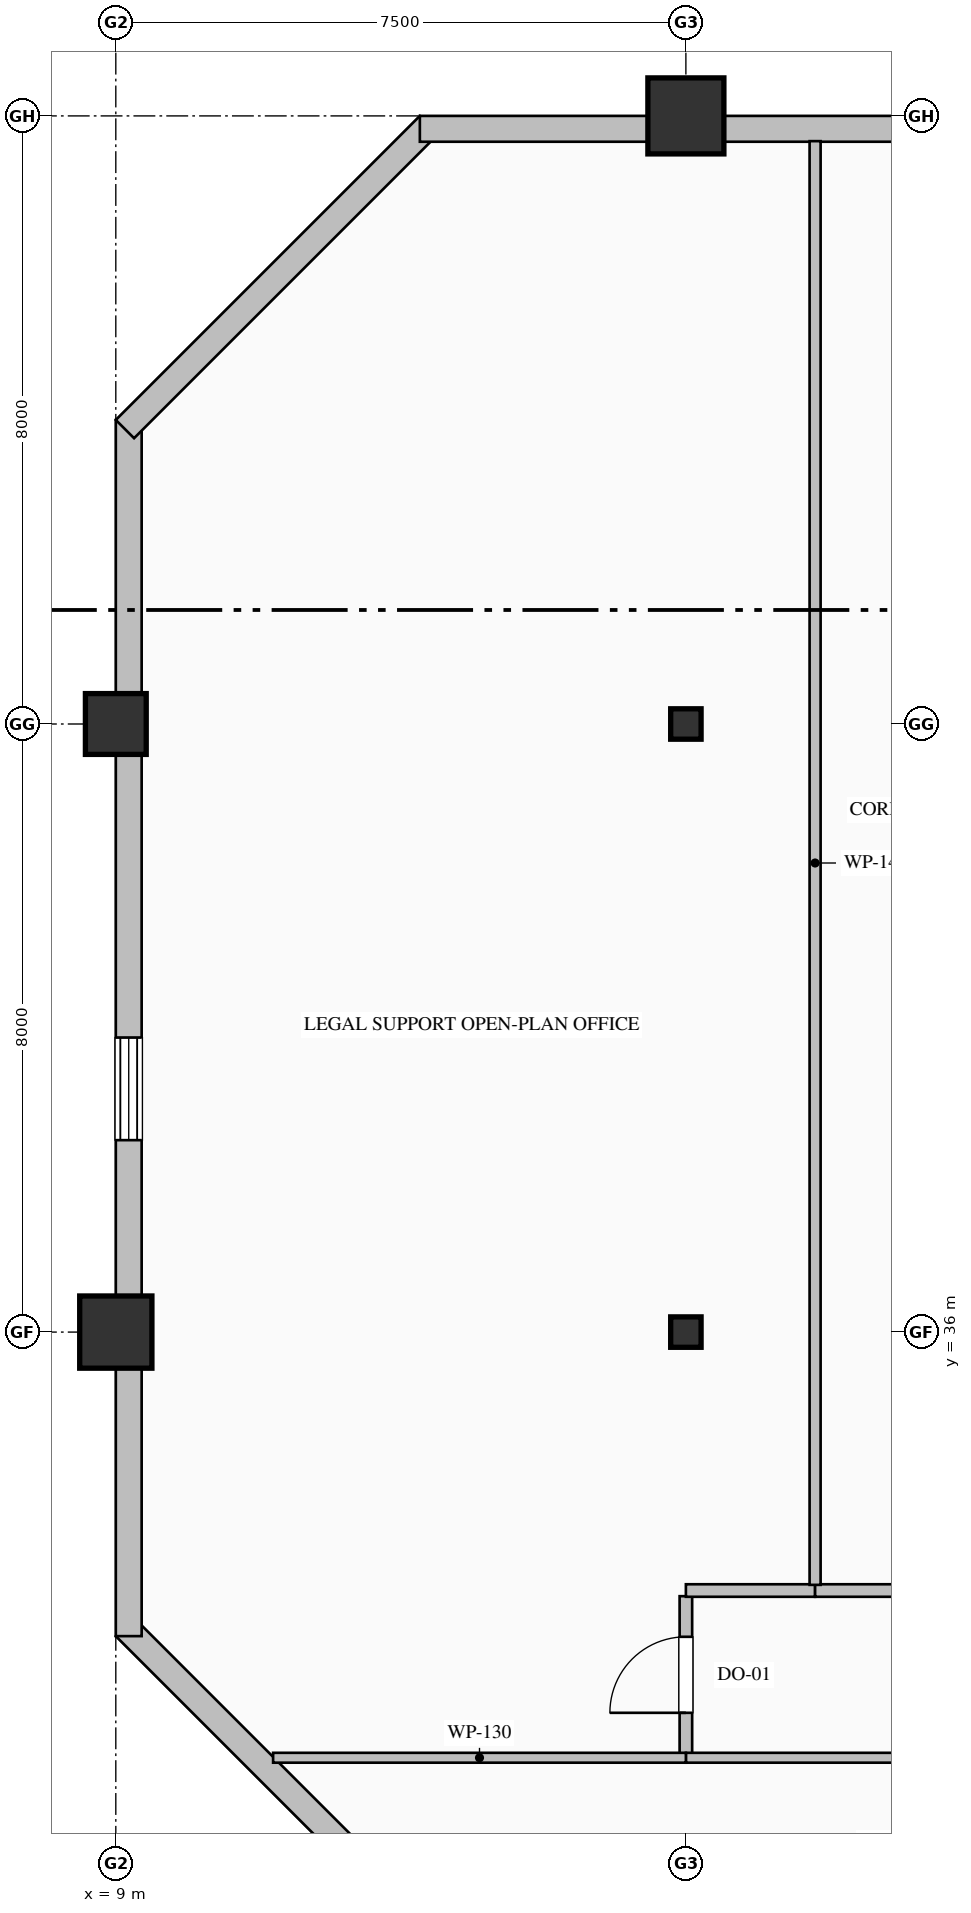
"""IFC4 building model, lengths in metres.
Left out: names, types, materials, properties, quantities, classifications, styles, units other than length and angle.
Written with IfcOpenShell. Run it as: python <this file> out.ifc"""

import sys

from ifc_helpers import new_model, si_unit, direction, frame, frame_2d, origin, origin_2d, place, context, subcontext, project, spatial, rectangle, hollow_rectangle, hollow_circle, i_section, extrude, element, fill, save


model = new_model("IFC4")
c1 = context("Model", 3, precision=1e-05, world=origin(), true_north=direction((0.0, 1.0)))
c2 = subcontext(c1, "Body", "Model", "MODEL_VIEW")
j1 = project(units=[si_unit("LENGTHUNIT", "METRE"), si_unit("PLANEANGLEUNIT", "RADIAN")], contexts=[c1])
p1 = place(None, origin())
s1 = spatial("IfcSite", under=j1, at=p1, CompositionType="ELEMENT")
p2 = place(p1, origin())
s2 = spatial("IfcBuilding", under=s1, at=p2, CompositionType="ELEMENT")
p3 = place(p2, frame((0.0, 0.0, 273.8)))
s3 = spatial("IfcBuildingStorey", under=s2, at=p3, CompositionType="ELEMENT", Elevation=273.8)
p4 = place(p3, frame((9.0, 36.0, 0.0), z_axis=(0.0, 0.0, 1.0), x_axis=(1.0, 0.0, 0.0)))
e1 = element("IfcColumn", 1, at=p4, inside=s3, PredefinedType="COLUMN", context=c2, shape_type="SweptSolid", body=[
    extrude(hollow_rectangle(XDim=0.95, YDim=0.95, WallThickness=0.036, at=origin_2d()), origin(), (0.0, 0.0, 1.0), 4.0),
])
p5 = place(p3, frame((9.0, 44.0, 0.0), z_axis=(0.0, 0.0, 1.0), x_axis=(1.0, 0.0, 0.0)))
e2 = element("IfcColumn", 2, at=p5, inside=s3, PredefinedType="COLUMN", context=c2, shape_type="SweptSolid", body=[
    extrude(hollow_rectangle(XDim=0.8, YDim=0.8, WallThickness=0.032, at=origin_2d()), origin(), (0.0, 0.0, 1.0), 4.0),
])
for number, where, z_axis, x_axis in (
    (3, (16.5, 36.0, 0.0), (0.0, 0.0, 1.0), (1.0, 0.0, 0.0)),
    (4, (16.5, 44.0, 0.0), (0.0, 0.0, 1.0), (1.0, 0.0, 0.0)),
):
    element("IfcColumn", number, at=place(p3, frame(where, z_axis=z_axis, x_axis=x_axis)), inside=s3, PredefinedType="COLUMN", context=c2, shape_type="SweptSolid", body=[
        extrude(i_section(OverallWidth=0.4, OverallDepth=0.4, WebThickness=0.013, FlangeThickness=0.021, FilletRadius=0.022, at=origin_2d()), origin(), (0.0, 0.0, 1.0), 4.0),
    ])
p6 = place(p3, frame((16.5, 52.0, 0.0), z_axis=(0.0, 0.0, 1.0), x_axis=(1.0, 0.0, 0.0)))
e5 = element("IfcColumn", 5, at=p6, inside=s3, PredefinedType="COLUMN", context=c2, shape_type="SweptSolid", body=[
    extrude(hollow_circle(Radius=0.5, WallThickness=0.036, at=origin_2d()), origin(), (0.0, 0.0, 1.0), 4.0),
])
p7 = place(p3, frame((13.12, 28.12, 0.0), z_axis=(0.0, 0.0, 1.0), x_axis=(-0.707106781187, 0.707106781187, 0.0)))
e6 = element("IfcWall", 6, at=p7, inside=s3, PredefinedType="SOLIDWALL", context=c2, shape_type="SweptSolid", body=[
    extrude(rectangle(XDim=5.657, YDim=0.34, at=frame_2d((2.828, 0.0))), origin(), (0.0, 0.0, 1.0), 3.775),
])
p8 = place(p3, frame((9.17, 32.0, 0.0), z_axis=(0.0, 0.0, 1.0), x_axis=(0.0, 1.0, 0.0)))
e7 = element("IfcWall", 7, at=p8, inside=s3, PredefinedType="SOLIDWALL", context=c2, shape_type="SweptSolid", body=[
    extrude(rectangle(XDim=16.0, YDim=0.34, at=frame_2d((8.0, 0.0))), origin(), (0.0, 0.0, 1.0), 3.325),
])
p9 = place(p8, frame((6.525, 0.0, 0.9)))
e8 = element("IfcOpeningElement", 8, at=p9, cuts=e7, PredefinedType="OPENING", context=c2, shape_type="SweptSolid", body=[
    extrude(rectangle(XDim=1.35, YDim=1.85, at=frame_2d((0.675, 0.925))), frame((0.0, 0.18, 0.0), z_axis=(0.0, -1.0, 0.0), x_axis=(1.0, 0.0, 0.0)), (0.0, 0.0, 1.0), 0.36),
])
p10 = place(p3, frame((9.12, 47.88, 0.0), z_axis=(0.0, 0.0, 1.0), x_axis=(0.707106781187, 0.707106781187, 0.0)))
e9 = element("IfcWall", 9, at=p10, inside=s3, PredefinedType="SOLIDWALL", context=c2, shape_type="SweptSolid", body=[
    extrude(rectangle(XDim=5.657, YDim=0.34, at=frame_2d((2.828, 0.0))), origin(), (0.0, 0.0, 1.0), 3.775),
])
p11 = place(p3, frame((13.0, 51.83, 0.0), z_axis=(0.0, 0.0, 1.0), x_axis=(1.0, 0.0, 0.0)))
e10 = element("IfcWall", 10, at=p11, inside=s3, PredefinedType="SOLIDWALL", context=c2, shape_type="SweptSolid", body=[
    extrude(rectangle(XDim=27.52, YDim=0.34, at=frame_2d((13.76, 0.0))), origin(), (0.0, 0.0, 1.0), 3.325),
])
p12 = place(p11, frame((6.6, 0.0, 0.9)))
e11 = element("IfcOpeningElement", 11, at=p12, cuts=e10, PredefinedType="OPENING", context=c2, shape_type="SweptSolid", body=[
    extrude(rectangle(XDim=1.2, YDim=1.85, at=frame_2d((0.6, 0.925))), frame((0.0, 0.18, 0.0), z_axis=(0.0, -1.0, 0.0), x_axis=(1.0, 0.0, 0.0)), (0.0, 0.0, 1.0), 0.36),
])
p13 = place(p11, frame((17.4, 0.0, 0.9)))
e12 = element("IfcOpeningElement", 12, at=p13, cuts=e10, PredefinedType="OPENING", context=c2, shape_type="SweptSolid", body=[
    extrude(rectangle(XDim=1.2, YDim=1.85, at=frame_2d((0.6, 0.925))), frame((0.0, 0.18, 0.0), z_axis=(0.0, -1.0, 0.0), x_axis=(1.0, 0.0, 0.0)), (0.0, 0.0, 1.0), 0.36),
])
p14 = place(p3, frame((16.5, 30.457, 0.0), z_axis=(0.0, 0.0, 1.0), x_axis=(0.0, 1.0, 0.0)))
e13 = element("IfcWall", 13, at=p14, inside=s3, PredefinedType="PARTITIONING", context=c2, shape_type="SweptSolid", body=[
    extrude(rectangle(XDim=2.068, YDim=0.165, at=frame_2d((1.034, 0.0))), origin(), (0.0, 0.0, 1.0), 3.179),
])
p15 = place(p14, frame((0.534, 0.0, 0.0)))
e14 = element("IfcOpeningElement", 14, at=p15, cuts=e13, PredefinedType="OPENING", context=c2, shape_type="SweptSolid", body=[
    extrude(rectangle(XDim=1.0, YDim=2.15, at=frame_2d((0.5, 1.075))), frame((0.0, 0.093, 0.0), z_axis=(0.0, -1.0, 0.0), x_axis=(1.0, 0.0, 0.0)), (0.0, 0.0, 1.0), 0.185),
])
p16 = place(p3, frame((16.5, 32.6, 0.0), z_axis=(0.0, 0.0, 1.0), x_axis=(1.0, 0.0, 0.0)))
e15 = element("IfcWall", 15, at=p16, inside=s3, PredefinedType="PARTITIONING", context=c2, shape_type="SweptSolid", body=[
    extrude(rectangle(XDim=1.7, YDim=0.165, at=frame_2d((0.85, 0.0))), origin(), (0.0, 0.0, 1.0), 3.775),
])
p17 = place(p3, frame((18.2, 32.6, 0.0), z_axis=(0.0, 0.0, 1.0), x_axis=(1.0, 0.0, 0.0)))
e16 = element("IfcWall", 16, at=p17, inside=s3, PredefinedType="PARTITIONING", context=c2, shape_type="SweptSolid", body=[
    extrude(rectangle(XDim=4.6, YDim=0.165, at=frame_2d((2.3, 0.0))), origin(), (0.0, 0.0, 1.0), 3.775),
])
p18 = place(p17, frame((1.85, 0.0, 0.0)))
e17 = element("IfcOpeningElement", 17, at=p18, cuts=e16, PredefinedType="OPENING", context=c2, shape_type="SweptSolid", body=[
    extrude(rectangle(XDim=0.9, YDim=2.15, at=frame_2d((0.45, 1.075))), frame((0.0, 0.093, 0.0), z_axis=(0.0, -1.0, 0.0), x_axis=(1.0, 0.0, 0.0)), (0.0, 0.0, 1.0), 0.185),
])
p19 = place(p3, frame((37.8, 30.4, 0.0), z_axis=(0.0, 0.0, 1.0), x_axis=(-1.0, 0.0, 0.0)))
e18 = element("IfcWall", 18, at=p19, inside=s3, PredefinedType="PARTITIONING", context=c2, shape_type="SweptSolid", body=[
    extrude(rectangle(XDim=21.3, YDim=0.13, at=frame_2d((10.65, 0.0))), origin(), (0.0, 0.0, 1.0), 3.775),
])
p20 = place(p19, frame((10.15, 0.0, 0.0)))
e19 = element("IfcOpeningElement", 19, at=p20, cuts=e18, PredefinedType="OPENING", context=c2, shape_type="SweptSolid", body=[
    extrude(rectangle(XDim=1.0, YDim=2.15, at=frame_2d((0.5, 1.075))), frame((0.0, 0.075, 0.0), z_axis=(0.0, -1.0, 0.0), x_axis=(1.0, 0.0, 0.0)), (0.0, 0.0, 1.0), 0.15),
])
p21 = place(p3, frame((18.2, 51.668, 0.0), z_axis=(0.0, 0.0, 1.0), x_axis=(0.0, -1.0, 0.0)))
e20 = element("IfcWall", 20, at=p21, inside=s3, PredefinedType="PARTITIONING", context=c2, shape_type="SweptSolid", body=[
    extrude(rectangle(XDim=18.993, YDim=0.145, at=frame_2d((9.497, 0.0))), origin(), (0.0, 0.0, 1.0), 3.775),
])
p22 = place(p3, frame((16.5, 30.4, 0.0), z_axis=(0.0, 0.0, 1.0), x_axis=(-1.0, 0.0, 0.0)))
e21 = element("IfcWall", 21, at=p22, inside=s3, PredefinedType="PARTITIONING", context=c2, shape_type="SweptSolid", body=[
    extrude(rectangle(XDim=5.43, YDim=0.13, at=frame_2d((2.715, 0.0))), origin(), (0.0, 0.0, 1.0), 3.775),
])
p23 = place(p9, origin())
e22 = element("IfcWindow", 22, at=p23, inside=s3, PartitioningType="DOUBLE_PANEL_VERTICAL", PredefinedType="WINDOW", context=c2, shape_type="SweptSolid", body=[
    extrude(rectangle(XDim=1.35, YDim=1.85, at=frame_2d((0.675, 0.925))), frame((0.0, 0.15, 0.0), z_axis=(0.0, -1.0, 0.0), x_axis=(1.0, 0.0, 0.0)), (0.0, 0.0, 1.0), 0.06),
])
fill(e8, e22)
p24 = place(p15, origin())
e23 = element("IfcDoor", 23, at=p24, inside=s3, OperationType="SINGLE_SWING_LEFT", PredefinedType="DOOR", context=c2, shape_type="SweptSolid", body=[
    extrude(rectangle(XDim=1.0, YDim=2.15, at=frame_2d((0.5, 1.075))), frame((0.0, 0.025, 0.0), z_axis=(0.0, -1.0, 0.0), x_axis=(1.0, 0.0, 0.0)), (0.0, 0.0, 1.0), 0.05),
])
fill(e14, e23)
save(model, sys.argv[1])
